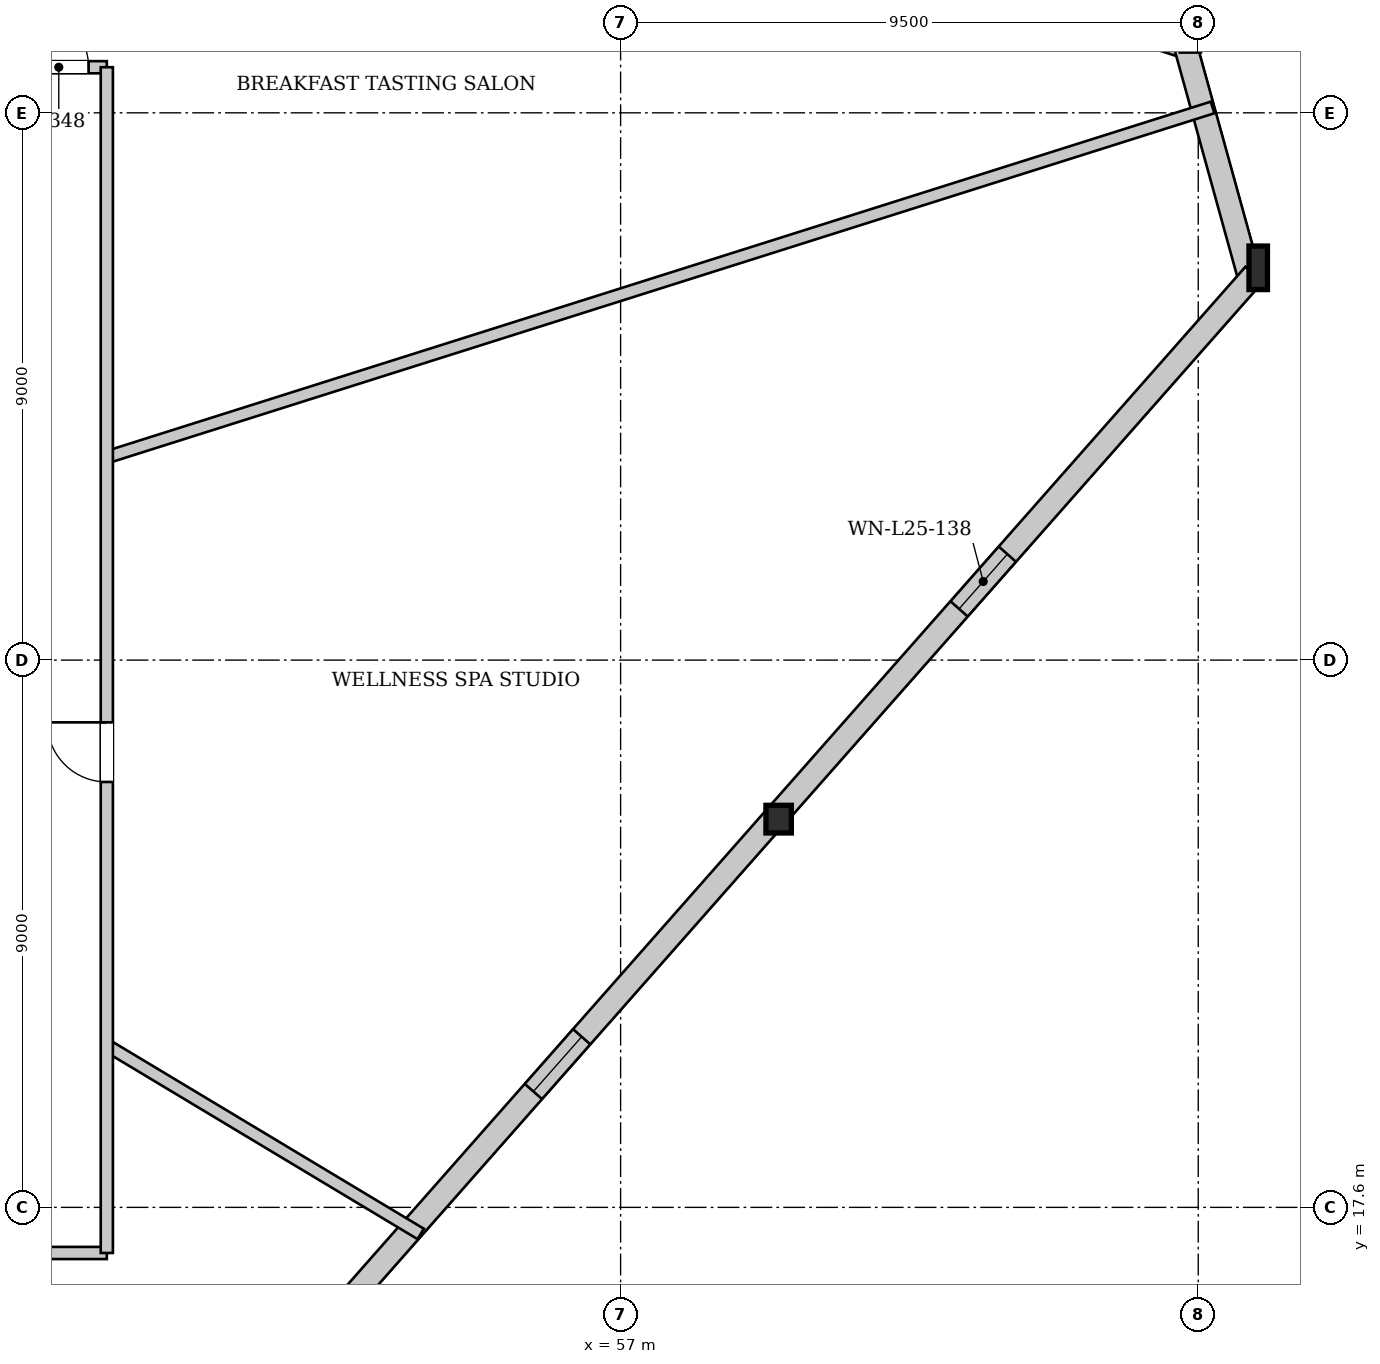
"""IFC4 building model, lengths in metres.
Left out: names, types, materials, properties, quantities, classifications, styles, units other than length and angle.
Written with IfcOpenShell. Run it as: python <this file> out.ifc"""

import sys

from ifc_helpers import new_model, si_unit, direction, frame, frame_2d, origin, origin_2d, place, context, subcontext, project, spatial, rectangle, i_section, extrude, source, transform, mapped, element, fill, save


model = new_model("IFC4")
c1 = context("Model", 3, precision=1e-05, world=origin(), true_north=direction((0.0, 1.0)))
c2 = subcontext(c1, "Body", "Model", "MODEL_VIEW")
j1 = project(units=[si_unit("LENGTHUNIT", "METRE"), si_unit("PLANEANGLEUNIT", "RADIAN")], contexts=[c1])
p1 = place(None, origin())
s1 = spatial("IfcSite", under=j1, at=p1, CompositionType="ELEMENT")
p2 = place(p1, origin())
s2 = spatial("IfcBuilding", under=s1, at=p2, CompositionType="ELEMENT")
p3 = place(p2, frame((0.0, 0.0, 98.6)))
s3 = spatial("IfcBuildingStorey", under=s2, at=p3, CompositionType="ELEMENT", Elevation=98.6)
m1 = source(origin(), c2, "Body", "SweptSolid", [
    extrude(i_section(OverallWidth=0.304, OverallDepth=0.716, WebThickness=0.021, FlangeThickness=0.04, at=origin_2d()), origin(), (0.0, 0.0, 1.0), 3.421),
])
p4 = place(p3, frame((67.561, 32.817, 0.0), z_axis=(-0.043537632385, 0.137179228596, 0.989588972154), x_axis=(-0.953146965956, -0.302507621869, 0.0)))
e1 = element("IfcColumn", 1, at=p4, inside=s3, PredefinedType="COLUMN", context=c2, shape_type="MappedRepresentation", body=[
    mapped(m1, transform((0.0, 0.0, 0.0), x_axis=(1.0, 0.0, 0.0), y_axis=(0.0, 1.0, 0.0), z_axis=(0.0, 0.0, 1.0), scale=1.0)),
])
m2 = source(origin(), c2, "Body", "SweptSolid", [
    extrude(i_section(OverallWidth=0.304, OverallDepth=0.716, WebThickness=0.021, FlangeThickness=0.04, at=origin_2d()), origin(), (0.0, 0.0, 1.0), 3.416),
])
p5 = place(p3, frame((66.47, 36.764, 0.0), z_axis=(-0.058530529393, 0.121420475506, 0.990873980513), x_axis=(-0.900802013123, -0.43423004635, 0.0)))
e2 = element("IfcColumn", 2, at=p5, inside=s3, PredefinedType="COLUMN", context=c2, shape_type="MappedRepresentation", body=[
    mapped(m2, transform((0.0, 0.0, 0.0), x_axis=(1.0, 0.0, 0.0), y_axis=(0.0, 1.0, 0.0), z_axis=(0.0, 0.0, 1.0), scale=1.0)),
])
m3 = source(origin(), c2, "Body", "SweptSolid", [
    extrude(i_section(OverallWidth=0.418, OverallDepth=0.455, WebThickness=0.038, FlangeThickness=0.059, at=origin_2d()), origin(), (0.0, 0.0, 1.0), 3.406),
])
p6 = place(p3, frame((59.605, 23.798, 0.0), z_axis=(-0.00379957347, 0.109470729964, 0.993982757659), x_axis=(-0.999398200954, -0.034687691323, 0.0)))
e3 = element("IfcColumn", 3, at=p6, inside=s3, PredefinedType="COLUMN", context=c2, shape_type="MappedRepresentation", body=[
    mapped(m3, transform((0.0, 0.0, 0.0), x_axis=(1.0, 0.0, 0.0), y_axis=(0.0, 1.0, 0.0), z_axis=(0.0, 0.0, 1.0), scale=1.0)),
])
p7 = place(p3, frame((44.111, 43.829, 0.0), z_axis=(0.0, 0.0, 1.0), x_axis=(0.951457074242, -0.307781474224, 0.0)))
e4 = element("IfcWall", 4, at=p7, inside=s3, PredefinedType="SOLIDWALL", context=c2, shape_type="SweptSolid", body=[
    extrude(rectangle(XDim=23.448, YDim=0.32, at=frame_2d((11.724, 0.0))), origin(), (0.0, 0.0, 1.0), 2.692),
])
p8 = place(p7, frame((6.953, 0.0, 0.0)))
e5 = element("IfcOpeningElement", 5, at=p8, cuts=e4, PredefinedType="OPENING", context=c2, shape_type="SweptSolid", body=[
    extrude(rectangle(XDim=1.1, YDim=2.3, at=frame_2d((0.55, 1.15))), frame((0.0, 0.17, 0.0), z_axis=(0.0, -1.0, 0.0), x_axis=(1.0, 0.0, 0.0)), (0.0, 0.0, 1.0), 0.34),
])
p9 = place(p7, frame((16.451, 0.0, 0.372)))
e6 = element("IfcOpeningElement", 6, at=p9, cuts=e4, PredefinedType="OPENING", context=c2, shape_type="SweptSolid", body=[
    extrude(rectangle(XDim=1.8, YDim=2.2, at=frame_2d((0.9, 1.1))), frame((0.0, 0.17, 0.0), z_axis=(0.0, -1.0, 0.0), x_axis=(1.0, 0.0, 0.0)), (0.0, 0.0, 1.0), 0.34),
])
p10 = place(p3, frame((66.287, 36.713, 0.0), z_axis=(0.0, 0.0, 1.0), x_axis=(0.266419915457, -0.963857058203, 0.0)))
e7 = element("IfcWall", 7, at=p10, inside=s3, PredefinedType="SOLIDWALL", context=c2, shape_type="SweptSolid", body=[
    extrude(rectangle(XDim=4.095, YDim=0.38, at=frame_2d((2.048, 0.0))), origin(), (0.0, 0.0, 1.0), 2.692),
])
p11 = place(p3, frame((67.418, 32.942, 0.0), z_axis=(0.0, 0.0, 1.0), x_axis=(-0.661521919695, -0.749925829508, 0.0)))
e8 = element("IfcWall", 8, at=p11, inside=s3, PredefinedType="SOLIDWALL", context=c2, shape_type="SweptSolid", body=[
    extrude(rectangle(XDim=24.051, YDim=0.38, at=frame_2d((12.026, 0.0))), origin(), (0.0, 0.0, 1.0), 2.692),
])
p12 = place(p11, frame((6.134, 0.0, 0.65)))
e9 = element("IfcOpeningElement", 9, at=p12, cuts=e8, PredefinedType="OPENING", context=c2, shape_type="SweptSolid", body=[
    extrude(rectangle(XDim=1.2, YDim=1.5, at=frame_2d((0.6, 0.75))), frame((0.0, 0.2, 0.0), z_axis=(0.0, -1.0, 0.0), x_axis=(1.0, 0.0, 0.0)), (0.0, 0.0, 1.0), 0.4),
])
p13 = place(p11, frame((16.717, 0.0, 0.65)))
e10 = element("IfcOpeningElement", 10, at=p13, cuts=e8, PredefinedType="OPENING", context=c2, shape_type="SweptSolid", body=[
    extrude(rectangle(XDim=1.2, YDim=1.5, at=frame_2d((0.6, 0.75))), frame((0.0, 0.2, 0.0), z_axis=(0.0, -1.0, 0.0), x_axis=(1.0, 0.0, 0.0)), (0.0, 0.0, 1.0), 0.4),
])
p14 = place(p3, frame((48.55, 20.264, 0.0), z_axis=(0.0, 0.0, 1.0), x_axis=(0.857260317922, -0.514883236586, 0.0)))
e11 = element("IfcWall", 11, at=p14, inside=s3, PredefinedType="PARTITIONING", context=c2, shape_type="SweptSolid", body=[
    extrude(rectangle(XDim=6.022, YDim=0.2, at=frame_2d((3.011, 0.0))), origin(), (0.0, 0.0, 1.0), 3.3),
])
p15 = place(p3, frame((48.55, 29.937, 0.0), z_axis=(0.0, 0.0, 1.0), x_axis=(0.953449672839, 0.301552186798, 0.0)))
e12 = element("IfcWall", 12, at=p15, inside=s3, PredefinedType="PARTITIONING", context=c2, shape_type="SweptSolid", body=[
    extrude(rectangle(XDim=19.074, YDim=0.2, at=frame_2d((9.537, 0.0))), origin(), (0.0, 0.0, 1.0), 3.3),
])
p16 = place(p3, frame((27.45, 16.85, 0.0), z_axis=(0.0, 0.0, 1.0), x_axis=(1.0, 0.0, 0.0)))
e13 = element("IfcWall", 13, at=p16, inside=s3, PredefinedType="PARTITIONING", context=c2, shape_type="SweptSolid", body=[
    extrude(rectangle(XDim=21.1, YDim=0.2, at=frame_2d((10.55, 0.0))), origin(), (0.0, 0.0, 1.0), 3.3),
])
p17 = place(p16, frame((0.3, 0.0, 0.0)))
e14 = element("IfcOpeningElement", 14, at=p17, cuts=e13, PredefinedType="OPENING", context=c2, shape_type="SweptSolid", body=[
    extrude(rectangle(XDim=0.98, YDim=2.15, at=frame_2d((0.49, 1.075))), frame((0.0, 0.11, 0.0), z_axis=(0.0, -1.0, 0.0), x_axis=(1.0, 0.0, 0.0)), (0.0, 0.0, 1.0), 0.22),
])
p18 = place(p16, frame((14.957, 0.0, 0.0)))
e15 = element("IfcOpeningElement", 15, at=p18, cuts=e13, PredefinedType="OPENING", context=c2, shape_type="SweptSolid", body=[
    extrude(rectangle(XDim=0.98, YDim=2.15, at=frame_2d((0.49, 1.075))), frame((0.0, 0.11, 0.0), z_axis=(0.0, -1.0, 0.0), x_axis=(1.0, 0.0, 0.0)), (0.0, 0.0, 1.0), 0.22),
])
p19 = place(p3, frame((27.45, 36.35, 0.0), z_axis=(0.0, 0.0, 1.0), x_axis=(1.0, 0.0, 0.0)))
e16 = element("IfcWall", 16, at=p19, inside=s3, PredefinedType="PARTITIONING", context=c2, shape_type="SweptSolid", body=[
    extrude(rectangle(XDim=21.1, YDim=0.2, at=frame_2d((10.55, 0.0))), origin(), (0.0, 0.0, 1.0), 3.3),
])
p20 = place(p19, frame((19.82, 0.0, 0.0)))
e17 = element("IfcOpeningElement", 17, at=p20, cuts=e16, PredefinedType="OPENING", context=c2, shape_type="SweptSolid", body=[
    extrude(rectangle(XDim=0.98, YDim=2.15, at=frame_2d((0.49, 1.075))), frame((0.0, 0.11, 0.0), z_axis=(0.0, -1.0, 0.0), x_axis=(1.0, 0.0, 0.0)), (0.0, 0.0, 1.0), 0.22),
])
p21 = place(p19, frame((8.782, 0.0, 0.0)))
e18 = element("IfcOpeningElement", 18, at=p21, cuts=e16, PredefinedType="OPENING", context=c2, shape_type="SweptSolid", body=[
    extrude(rectangle(XDim=0.98, YDim=2.15, at=frame_2d((0.49, 1.075))), frame((0.0, 0.11, 0.0), z_axis=(0.0, -1.0, 0.0), x_axis=(1.0, 0.0, 0.0)), (0.0, 0.0, 1.0), 0.22),
])
p22 = place(p3, frame((48.55, 16.85, 0.0), z_axis=(0.0, 0.0, 1.0), x_axis=(0.0, 1.0, 0.0)))
e19 = element("IfcWall", 19, at=p22, inside=s3, PredefinedType="PARTITIONING", context=c2, shape_type="SweptSolid", body=[
    extrude(rectangle(XDim=19.5, YDim=0.2, at=frame_2d((9.75, 0.0))), origin(), (0.0, 0.0, 1.0), 3.3),
])
p23 = place(p22, frame((7.746, 0.0, 0.0)))
e20 = element("IfcOpeningElement", 20, at=p23, cuts=e19, PredefinedType="OPENING", context=c2, shape_type="SweptSolid", body=[
    extrude(rectangle(XDim=0.98, YDim=2.15, at=frame_2d((0.49, 1.075))), frame((0.0, 0.11, 0.0), z_axis=(0.0, -1.0, 0.0), x_axis=(1.0, 0.0, 0.0)), (0.0, 0.0, 1.0), 0.22),
])
m4 = source(origin(), c2, "Body", "SweptSolid", [
    extrude(rectangle(XDim=1.2, YDim=1.5, at=frame_2d((0.6, 0.75))), frame((0.0, 0.03, 0.0), z_axis=(0.0, -1.0, 0.0), x_axis=(1.0, 0.0, 0.0)), (0.0, 0.0, 1.0), 0.06),
])
p24 = place(p12, origin())
e21 = element("IfcWindow", 21, at=p24, inside=s3, PartitioningType="SINGLE_PANEL", PredefinedType="WINDOW", context=c2, shape_type="MappedRepresentation", body=[
    mapped(m4, transform((0.0, 0.0, 0.0), x_axis=(1.0, 0.0, 0.0), y_axis=(0.0, 1.0, 0.0), z_axis=(0.0, 0.0, 1.0), scale=1.0)),
])
fill(e9, e21)
p25 = place(p13, origin())
e22 = element("IfcWindow", 22, at=p25, inside=s3, PartitioningType="SINGLE_PANEL", PredefinedType="WINDOW", context=c2, shape_type="MappedRepresentation", body=[
    mapped(m4, transform((0.0, 0.0, 0.0), x_axis=(1.0, 0.0, 0.0), y_axis=(0.0, 1.0, 0.0), z_axis=(0.0, 0.0, 1.0), scale=1.0)),
])
fill(e10, e22)
m5 = source(origin(), c2, "Body", "SweptSolid", [
    extrude(rectangle(XDim=0.98, YDim=2.15, at=frame_2d((0.49, 1.075))), frame((0.0, 0.025, 0.0), z_axis=(0.0, -1.0, 0.0), x_axis=(1.0, 0.0, 0.0)), (0.0, 0.0, 1.0), 0.05),
])
p26 = place(p20, origin())
e23 = element("IfcDoor", 23, at=p26, inside=s3, OperationType="SINGLE_SWING_LEFT", PredefinedType="DOOR", context=c2, shape_type="MappedRepresentation", body=[
    mapped(m5, transform((0.0, 0.0, 0.0), x_axis=(1.0, 0.0, 0.0), y_axis=(0.0, 1.0, 0.0), z_axis=(0.0, 0.0, 1.0), scale=1.0)),
])
fill(e17, e23)
p27 = place(p23, origin())
e24 = element("IfcDoor", 24, at=p27, inside=s3, OperationType="SINGLE_SWING_RIGHT", PredefinedType="DOOR", context=c2, shape_type="MappedRepresentation", body=[
    mapped(m5, transform((0.0, 0.0, 0.0), x_axis=(1.0, 0.0, 0.0), y_axis=(0.0, 1.0, 0.0), z_axis=(0.0, 0.0, 1.0), scale=1.0)),
])
fill(e20, e24)
save(model, sys.argv[1])
